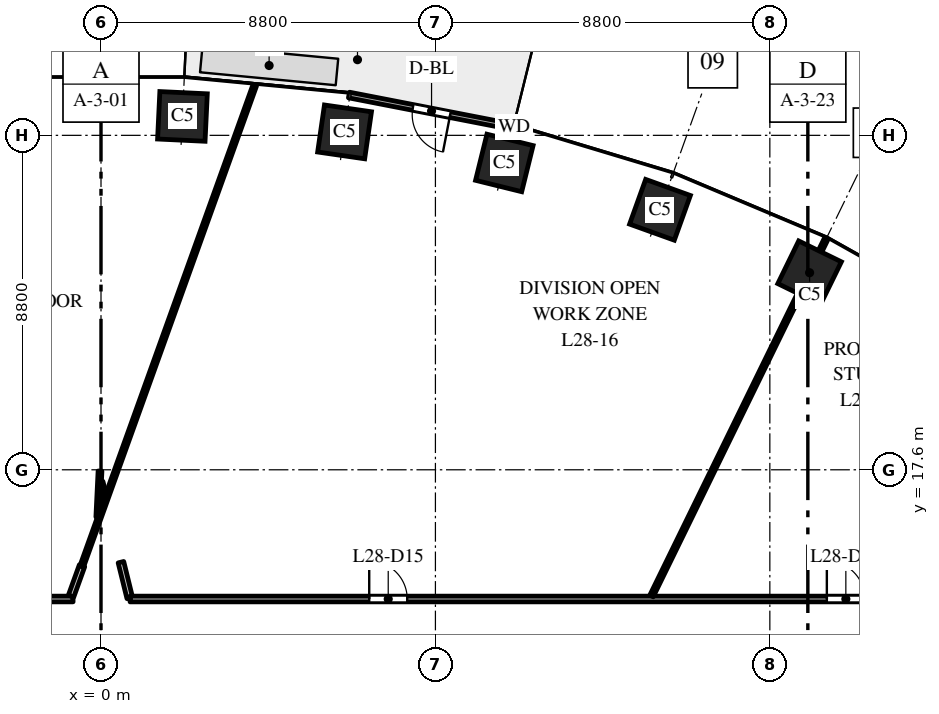
"""IFC4 building model, lengths in metres.
Left out: names, types, materials, properties, quantities, classifications, styles, units other than length and angle.
Written with IfcOpenShell. Run it as: python <this file> out.ifc"""

import sys

from ifc_helpers import new_model, si_unit, direction, frame, frame_2d, origin, origin_2d, place, context, subcontext, project, spatial, rectangle, extrude, element, fill, save


model = new_model("IFC4")
c1 = context("Model", 3, precision=1e-05, world=origin(), true_north=direction((0.0, 1.0)))
c2 = subcontext(c1, "Body", "Model", "MODEL_VIEW")
j1 = project(units=[si_unit("LENGTHUNIT", "METRE"), si_unit("PLANEANGLEUNIT", "RADIAN")], contexts=[c1])
p1 = place(None, origin())
s1 = spatial("IfcSite", under=j1, at=p1, CompositionType="ELEMENT")
p2 = place(p1, origin())
s2 = spatial("IfcBuilding", under=s1, at=p2, CompositionType="ELEMENT")
p3 = place(p2, frame((0.0, 0.0, 124.0)))
s3 = spatial("IfcBuildingStorey", under=s2, at=p3, CompositionType="ELEMENT", Elevation=124.0)
for number, where, z_axis, x_axis in (
    (1, (18.646, 22.785, 0.0), (0.0, 0.0, 1.0), (-0.898, 0.439, 0.0)),
    (2, (14.709, 24.441, 0.0), (0.0, 0.0, 1.0), (-0.941, 0.338, 0.0)),
    (3, (10.613, 25.674, 0.0), (0.0, 0.0, 1.0), (-0.971, 0.24, 0.0)),
    (4, (6.409, 26.491, 0.0), (0.0, 0.0, 1.0), (-0.99, 0.143, 0.0)),
    (5, (2.143, 26.898, 0.0), (0.0, 0.0, 1.0), (-0.999, 0.048, 0.0)),
):
    element("IfcColumn", number, at=place(p3, frame(where, z_axis=z_axis, x_axis=x_axis)), inside=s3, PredefinedType="COLUMN", context=c2, shape_type="SweptSolid", body=[
        extrude(rectangle(XDim=1.25, YDim=1.25, at=origin_2d()), origin(), (0.0, 0.0, 1.0), 4.0),
    ])
p4 = place(p3, frame((10.871, 26.617, 0.0), z_axis=(0.0, 0.0, 1.0), x_axis=(-0.981631174778, 0.190788460615, 0.0)))
e6 = element("IfcWall", 6, at=p4, inside=s3, PredefinedType="STANDARD", context=c2, shape_type="SweptSolid", body=[
    extrude(rectangle(XDim=4.426, YDim=0.15, at=frame_2d((2.213, 0.0))), origin(), (0.0, 0.0, 1.0), 3.7),
])
p5 = place(p4, frame((1.713, 0.0, 0.0)))
e7 = element("IfcOpeningElement", 7, at=p5, cuts=e6, PredefinedType="OPENING", context=c2, shape_type="SweptSolid", body=[
    extrude(rectangle(XDim=1.0, YDim=2.4, at=frame_2d((0.5, 1.2))), frame((0.0, 0.085, 0.0), z_axis=(0.0, -1.0, 0.0), x_axis=(1.0, 0.0, 0.0)), (0.0, 0.0, 1.0), 0.17),
])
p6 = place(p3, frame((-4.632, 14.2, 0.0), z_axis=(0.0, 0.0, 1.0), x_axis=(1.0, 0.0, 0.0)))
e8 = element("IfcWall", 8, at=p6, inside=s3, PredefinedType="PARTITIONING", context=c2, shape_type="SweptSolid", body=[
    extrude(rectangle(XDim=3.897, YDim=0.15, at=frame_2d((1.948, 0.0))), origin(), (0.0, 0.0, 1.0), 2.85),
])
p7 = place(p6, frame((1.417, 0.0, 0.0)))
e9 = element("IfcOpeningElement", 9, at=p7, cuts=e8, PredefinedType="OPENING", context=c2, shape_type="SweptSolid", body=[
    extrude(rectangle(XDim=1.0, YDim=2.1, at=frame_2d((0.5, 1.05))), frame((0.0, 0.085, 0.0), z_axis=(0.0, -1.0, 0.0), x_axis=(1.0, 0.0, 0.0)), (0.0, 0.0, 1.0), 0.17),
])
p8 = place(p3, frame((-0.788, 14.275, 0.0), z_axis=(0.0, 0.0, 1.0), x_axis=(0.339806666964, 0.940495310508, 0.0)))
e10 = element("IfcWall", 10, at=p8, inside=s3, PredefinedType="PARTITIONING", context=c2, shape_type="SweptSolid", body=[
    extrude(rectangle(XDim=0.851, YDim=0.15, at=frame_2d((0.425, 0.0))), origin(), (0.0, 0.0, 1.0), 3.7),
])
p9 = place(p3, frame((-0.509, 15.051, 0.0), z_axis=(0.0, 0.0, 1.0), x_axis=(0.338401519309, 0.941001812819, 0.0)))
e11 = element("IfcWall", 11, at=p9, inside=s3, PredefinedType="PARTITIONING", context=c2, shape_type="SweptSolid", body=[
    extrude(rectangle(XDim=13.46, YDim=0.1, at=frame_2d((6.73, 0.0))), origin(), (0.0, 0.0, 1.0), 2.9),
])
p10 = place(p3, frame((-0.084, 16.356, 0.0), z_axis=(0.0, 0.0, 1.0), x_axis=(0.047967320325, 0.998848905581, 0.0)))
e12 = element("IfcWall", 12, at=p10, inside=s3, PredefinedType="PARTITIONING", context=c2, shape_type="SweptSolid", body=[
    extrude(rectangle(XDim=1.211, YDim=0.1, at=frame_2d((0.606, 0.0))), origin(), (0.0, 0.0, 1.0), 3.7),
])
p11 = place(p3, frame((0.002, 17.284, 0.0), z_axis=(0.0, 0.0, 1.0), x_axis=(0.240121592304, -0.970742819139, 0.0)))
e13 = element("IfcWall", 13, at=p11, inside=s3, PredefinedType="PARTITIONING", context=c2, shape_type="SweptSolid", body=[
    extrude(rectangle(XDim=0.405, YDim=0.1, at=frame_2d((0.202, 0.0))), origin(), (0.0, 0.0, 1.0), 3.7),
])
p12 = place(p3, frame((0.525, 15.169, 0.0), z_axis=(0.0, 0.0, 1.0), x_axis=(0.239336638609, -0.97093664748, 0.0)))
e14 = element("IfcWall", 14, at=p12, inside=s3, PredefinedType="PARTITIONING", context=c2, shape_type="SweptSolid", body=[
    extrude(rectangle(XDim=0.97, YDim=0.15, at=frame_2d((0.485, 0.0))), origin(), (0.0, 0.0, 1.0), 3.7),
])
p13 = place(p3, frame((0.764, 14.2, 0.0), z_axis=(0.0, 0.0, 1.0), x_axis=(1.0, 0.0, 0.0)))
e15 = element("IfcWall", 15, at=p13, inside=s3, PredefinedType="PARTITIONING", context=c2, shape_type="SweptSolid", body=[
    extrude(rectangle(XDim=24.236, YDim=0.15, at=frame_2d((12.118, 0.0))), origin(), (0.0, 0.0, 1.0), 2.85),
])
p14 = place(p13, frame((6.294, 0.0, 0.0)))
e16 = element("IfcOpeningElement", 16, at=p14, cuts=e15, PredefinedType="OPENING", context=c2, shape_type="SweptSolid", body=[
    extrude(rectangle(XDim=1.0, YDim=2.1, at=frame_2d((0.5, 1.05))), frame((0.0, 0.085, 0.0), z_axis=(0.0, -1.0, 0.0), x_axis=(1.0, 0.0, 0.0)), (0.0, 0.0, 1.0), 0.17),
])
p15 = place(p13, frame((18.336, 0.0, 0.0)))
e17 = element("IfcOpeningElement", 17, at=p15, cuts=e15, PredefinedType="OPENING", context=c2, shape_type="SweptSolid", body=[
    extrude(rectangle(XDim=1.0, YDim=2.1, at=frame_2d((0.5, 1.05))), frame((0.0, 0.085, 0.0), z_axis=(0.0, -1.0, 0.0), x_axis=(1.0, 0.0, 0.0)), (0.0, 0.0, 1.0), 0.17),
])
p16 = place(p3, frame((14.487, 14.279, 0.0), z_axis=(0.0, 0.0, 1.0), x_axis=(0.439239825182, 0.898369843647, 0.0)))
e18 = element("IfcWall", 18, at=p16, inside=s3, PredefinedType="PARTITIONING", context=c2, shape_type="SweptSolid", body=[
    extrude(rectangle(XDim=10.47, YDim=0.1, at=frame_2d((5.235, 0.0))), origin(), (0.0, 0.0, 1.0), 2.9),
])
p17 = place(p5, origin())
e19 = element("IfcDoor", 19, at=p17, inside=s3, OperationType="SINGLE_SWING_LEFT", PredefinedType="DOOR", context=c2, shape_type="SweptSolid", body=[
    extrude(rectangle(XDim=1.0, YDim=2.4, at=frame_2d((0.5, 1.2))), frame((0.0, 0.025, 0.0), z_axis=(0.0, -1.0, 0.0), x_axis=(1.0, 0.0, 0.0)), (0.0, 0.0, 1.0), 0.05),
])
fill(e7, e19)
p18 = place(p14, origin())
e20 = element("IfcDoor", 20, at=p18, inside=s3, OperationType="SINGLE_SWING_LEFT", PredefinedType="DOOR", context=c2, shape_type="SweptSolid", body=[
    extrude(rectangle(XDim=1.0, YDim=2.1, at=frame_2d((0.5, 1.05))), frame((0.0, 0.025, 0.0), z_axis=(0.0, -1.0, 0.0), x_axis=(1.0, 0.0, 0.0)), (0.0, 0.0, 1.0), 0.05),
])
fill(e16, e20)
p19 = place(p15, origin())
e21 = element("IfcDoor", 21, at=p19, inside=s3, OperationType="SINGLE_SWING_LEFT", PredefinedType="DOOR", context=c2, shape_type="SweptSolid", body=[
    extrude(rectangle(XDim=1.0, YDim=2.1, at=frame_2d((0.5, 1.05))), frame((0.0, 0.025, 0.0), z_axis=(0.0, -1.0, 0.0), x_axis=(1.0, 0.0, 0.0)), (0.0, 0.0, 1.0), 0.05),
])
fill(e17, e21)
save(model, sys.argv[1])
